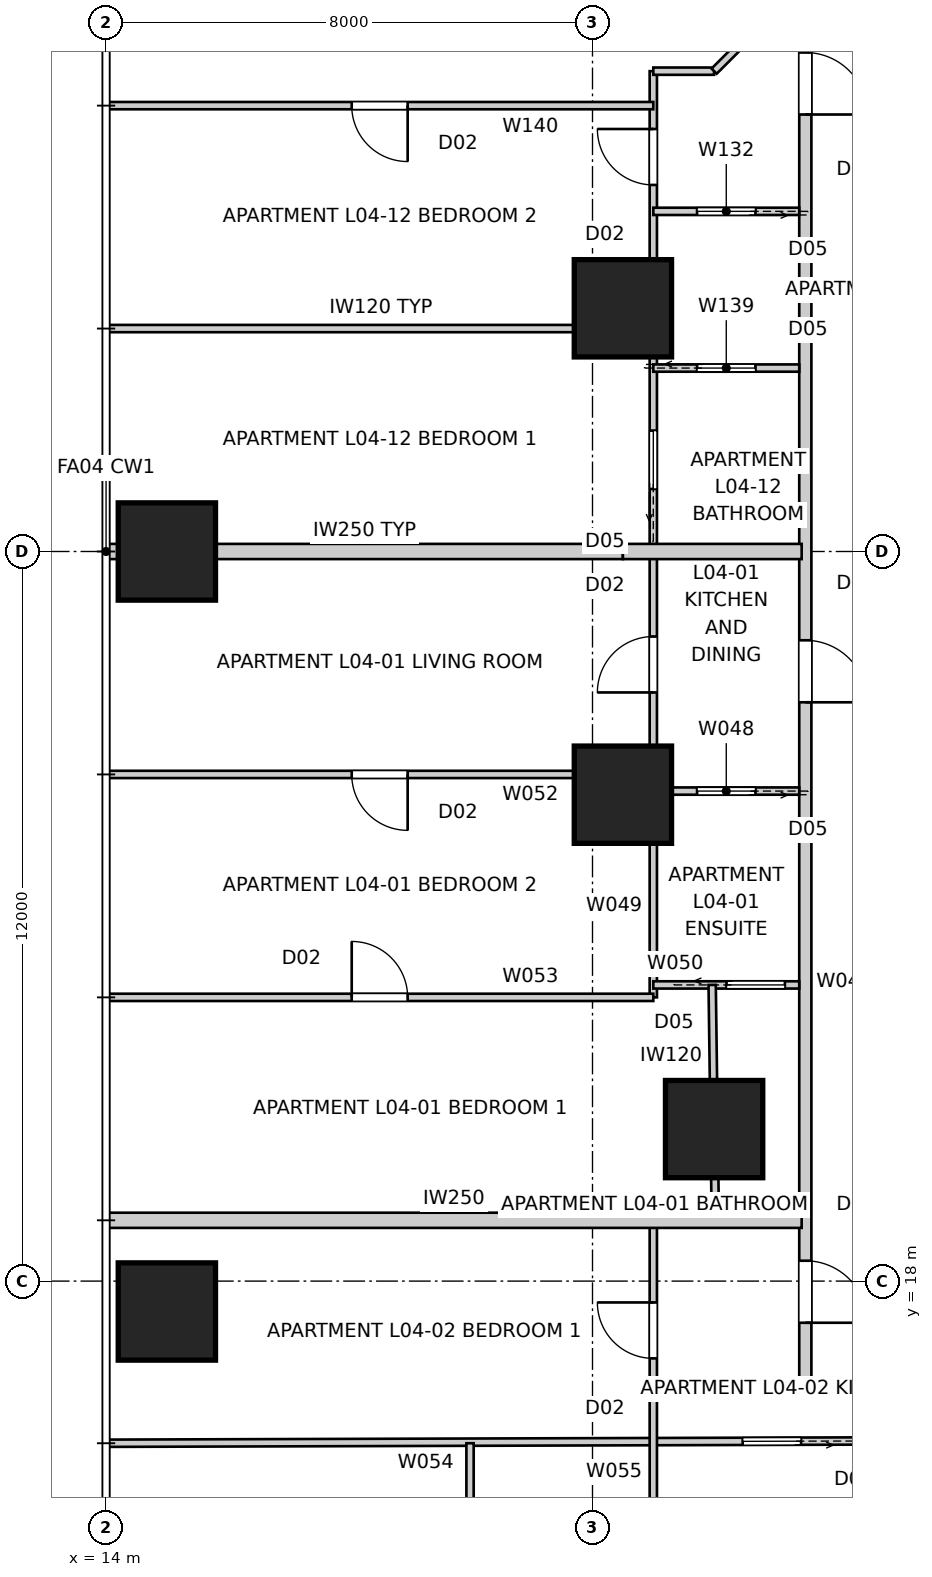
"""IFC4 building model, lengths in metres.
Left out: names, types, materials, properties, quantities, classifications, styles, units other than length and angle.
Written with IfcOpenShell. Run it as: python <this file> out.ifc"""

import sys

from ifc_helpers import new_model, si_unit, direction, frame, frame_2d, origin, origin_2d, place, context, subcontext, project, spatial, rectangle, extrude, element, fill, save


model = new_model("IFC4")
c1 = context("Model", 3, precision=1e-05, world=origin(), true_north=direction((0.0, 1.0)))
c2 = subcontext(c1, "Body", "Model", "MODEL_VIEW")
j1 = project(units=[si_unit("LENGTHUNIT", "METRE"), si_unit("PLANEANGLEUNIT", "RADIAN")], contexts=[c1])
p1 = place(None, origin())
s1 = spatial("IfcSite", under=j1, at=p1, CompositionType="ELEMENT")
p2 = place(p1, origin())
s2 = spatial("IfcBuilding", under=s1, at=p2, CompositionType="ELEMENT")
p3 = place(p2, frame((0.0, 0.0, 18.4)))
s3 = spatial("IfcBuildingStorey", under=s2, at=p3, CompositionType="ELEMENT", Elevation=18.4)
for number, where, z_axis, x_axis in (
    (1, (15.0, 30.0, 0.0), (0.0, 0.0, 1.0), (1.0, 0.0, 0.0)),
    (2, (15.0, 17.5, 0.0), (0.0, 0.0, 1.0), (1.0, 0.0, 0.0)),
    (3, (22.5, 34.0, 0.0), (0.0, 0.0, 1.0), (1.0, 0.0, 0.0)),
    (4, (22.5, 26.0, 0.0), (0.0, 0.0, 1.0), (1.0, 0.0, 0.0)),
    (5, (24.0, 20.5, 0.0), (0.0, 0.0, 1.0), (1.0, 0.0, 0.0)),
):
    element("IfcColumn", number, at=place(p3, frame(where, z_axis=z_axis, x_axis=x_axis)), inside=s3, PredefinedType="COLUMN", context=c2, shape_type="SweptSolid", body=[
        extrude(rectangle(XDim=1.6, YDim=1.6, at=origin_2d()), origin(), (0.0, 0.0, 1.0), 3.4),
    ])
p4 = place(p3, frame((25.5, 16.3, 0.0), z_axis=(0.0, 0.0, 1.0), x_axis=(1.0, 0.0, 0.0)))
e6 = element("IfcWall", 6, at=p4, inside=s3, PredefinedType="PARTITIONING", context=c2, shape_type="SweptSolid", body=[
    extrude(rectangle(XDim=29.0, YDim=0.2, at=frame_2d((14.5, 0.0))), origin(), (0.0, 0.0, 1.0), 3.25),
])
p5 = place(p4, frame((18.734, 0.0, 0.0)))
e7 = element("IfcOpeningElement", 7, at=p5, cuts=e6, PredefinedType="OPENING", context=c2, shape_type="SweptSolid", body=[
    extrude(rectangle(XDim=1.02, YDim=2.34, at=frame_2d((0.51, 1.17))), frame((0.0, 0.11, 0.0), z_axis=(0.0, -1.0, 0.0), x_axis=(1.0, 0.0, 0.0)), (0.0, 0.0, 1.0), 0.22),
])
p6 = place(p4, frame((5.096, 0.0, 0.0)))
e8 = element("IfcOpeningElement", 8, at=p6, cuts=e6, PredefinedType="OPENING", context=c2, shape_type="SweptSolid", body=[
    extrude(rectangle(XDim=1.02, YDim=2.34, at=frame_2d((0.51, 1.17))), frame((0.0, 0.11, 0.0), z_axis=(0.0, -1.0, 0.0), x_axis=(1.0, 0.0, 0.0)), (0.0, 0.0, 1.0), 0.22),
])
p7 = place(p3, frame((25.5, 43.7, 0.0), z_axis=(0.0, 0.0, 1.0), x_axis=(0.0, -1.0, 0.0)))
e9 = element("IfcWall", 9, at=p7, inside=s3, PredefinedType="PARTITIONING", context=c2, shape_type="SweptSolid", body=[
    extrude(rectangle(XDim=27.4, YDim=0.2, at=frame_2d((13.7, 0.0))), origin(), (0.0, 0.0, 1.0), 3.25),
])
p8 = place(p7, frame((5.493, 0.0, 0.0)))
e10 = element("IfcOpeningElement", 10, at=p8, cuts=e9, PredefinedType="OPENING", context=c2, shape_type="SweptSolid", body=[
    extrude(rectangle(XDim=1.02, YDim=2.34, at=frame_2d((0.51, 1.17))), frame((0.0, 0.11, 0.0), z_axis=(0.0, -1.0, 0.0), x_axis=(1.0, 0.0, 0.0)), (0.0, 0.0, 1.0), 0.22),
])
p9 = place(p7, frame((15.16, 0.0, 0.0)))
e11 = element("IfcOpeningElement", 11, at=p9, cuts=e9, PredefinedType="OPENING", context=c2, shape_type="SweptSolid", body=[
    extrude(rectangle(XDim=1.02, YDim=2.34, at=frame_2d((0.51, 1.17))), frame((0.0, 0.11, 0.0), z_axis=(0.0, -1.0, 0.0), x_axis=(1.0, 0.0, 0.0)), (0.0, 0.0, 1.0), 0.22),
])
p10 = place(p7, frame((25.365, 0.0, 0.0)))
e12 = element("IfcOpeningElement", 12, at=p10, cuts=e9, PredefinedType="OPENING", context=c2, shape_type="SweptSolid", body=[
    extrude(rectangle(XDim=1.02, YDim=2.34, at=frame_2d((0.51, 1.17))), frame((0.0, 0.11, 0.0), z_axis=(0.0, -1.0, 0.0), x_axis=(1.0, 0.0, 0.0)), (0.0, 0.0, 1.0), 0.22),
])
p11 = place(p7, frame((1.015, 0.0, 0.0)))
e13 = element("IfcOpeningElement", 13, at=p11, cuts=e9, PredefinedType="OPENING", context=c2, shape_type="SweptSolid", body=[
    extrude(rectangle(XDim=1.02, YDim=2.34, at=frame_2d((0.51, 1.17))), frame((0.0, 0.11, 0.0), z_axis=(0.0, -1.0, 0.0), x_axis=(1.0, 0.0, 0.0)), (0.0, 0.0, 1.0), 0.22),
])
p12 = place(p3, frame((14.0, 30.0, 0.0), z_axis=(0.0, 0.0, 1.0), x_axis=(1.0, 0.0, 0.0)))
e14 = element("IfcWall", 14, at=p12, inside=s3, PredefinedType="PARTITIONING", context=c2, shape_type="SweptSolid", body=[
    extrude(rectangle(XDim=8.5, YDim=0.25, at=frame_2d((4.25, 0.0))), origin(), (0.0, 0.0, 1.0), 3.25),
])
p13 = place(p3, frame((22.5, 30.0, 0.0), z_axis=(0.0, 0.0, 1.0), x_axis=(1.0, 0.0, 0.0)))
e15 = element("IfcWall", 15, at=p13, inside=s3, PredefinedType="PARTITIONING", context=c2, shape_type="SweptSolid", body=[
    extrude(rectangle(XDim=2.94, YDim=0.25, at=frame_2d((1.47, 0.0))), origin(), (0.0, 0.0, 1.0), 2.795),
])
p14 = place(p3, frame((14.0, 19.0, 0.0), z_axis=(0.0, 0.0, 1.0), x_axis=(1.0, 0.0, 0.0)))
e16 = element("IfcWall", 16, at=p14, inside=s3, PredefinedType="PARTITIONING", context=c2, shape_type="SweptSolid", body=[
    extrude(rectangle(XDim=11.44, YDim=0.25, at=frame_2d((5.72, 0.0))), origin(), (0.0, 0.0, 1.0), 3.25),
])
p15 = place(p3, frame((25.4, 26.06, 0.0), z_axis=(0.0, 0.0, 1.0), x_axis=(-1.0, 0.0, 0.0)))
e17 = element("IfcWall", 17, at=p15, inside=s3, PredefinedType="PARTITIONING", context=c2, shape_type="SweptSolid", body=[
    extrude(rectangle(XDim=2.4, YDim=0.12, at=frame_2d((1.2, 0.0))), origin(), (0.0, 0.0, 1.0), 3.25),
])
p16 = place(p15, frame((0.72, 0.0, 0.0)))
e18 = element("IfcOpeningElement", 18, at=p16, cuts=e17, PredefinedType="OPENING", context=c2, shape_type="SweptSolid", body=[
    extrude(rectangle(XDim=0.96, YDim=2.1, at=frame_2d((0.48, 1.05))), frame((0.0, 0.07, 0.0), z_axis=(0.0, -1.0, 0.0), x_axis=(1.0, 0.0, 0.0)), (0.0, 0.0, 1.0), 0.14),
])
p17 = place(p3, frame((23.0, 22.667, 0.0), z_axis=(0.0, 0.0, 1.0), x_axis=(0.0, 1.0, 0.0)))
e19 = element("IfcWall", 19, at=p17, inside=s3, PredefinedType="PARTITIONING", context=c2, shape_type="SweptSolid", body=[
    extrude(rectangle(XDim=15.233, YDim=0.12, at=frame_2d((7.617, 0.0))), origin(), (0.0, 0.0, 1.0), 2.55),
])
p18 = place(p17, frame((13.362, 0.0, 0.0)))
e20 = element("IfcOpeningElement", 20, at=p18, cuts=e19, PredefinedType="OPENING", context=c2, shape_type="SweptSolid", body=[
    extrude(rectangle(XDim=0.92, YDim=2.34, at=frame_2d((0.46, 1.17))), frame((0.0, 0.07, 0.0), z_axis=(0.0, -1.0, 0.0), x_axis=(1.0, 0.0, 0.0)), (0.0, 0.0, 1.0), 0.14),
])
p19 = place(p17, frame((5.015, 0.0, 0.0)))
e21 = element("IfcOpeningElement", 21, at=p19, cuts=e19, PredefinedType="OPENING", context=c2, shape_type="SweptSolid", body=[
    extrude(rectangle(XDim=0.92, YDim=2.34, at=frame_2d((0.46, 1.17))), frame((0.0, 0.07, 0.0), z_axis=(0.0, -1.0, 0.0), x_axis=(1.0, 0.0, 0.0)), (0.0, 0.0, 1.0), 0.14),
])
p20 = place(p17, frame((8.362, 0.0, 0.0)))
e22 = element("IfcOpeningElement", 22, at=p20, cuts=e19, PredefinedType="OPENING", context=c2, shape_type="SweptSolid", body=[
    extrude(rectangle(XDim=0.96, YDim=2.1, at=frame_2d((0.48, 1.05))), frame((0.0, 0.07, 0.0), z_axis=(0.0, -1.0, 0.0), x_axis=(1.0, 0.0, 0.0)), (0.0, 0.0, 1.0), 0.14),
])
p21 = place(p3, frame((23.0, 22.871, 0.0), z_axis=(0.0, 0.0, 1.0), x_axis=(1.0, 0.0, 0.0)))
e23 = element("IfcWall", 23, at=p21, inside=s3, PredefinedType="PARTITIONING", context=c2, shape_type="SweptSolid", body=[
    extrude(rectangle(XDim=2.4, YDim=0.12, at=frame_2d((1.2, 0.0))), origin(), (0.0, 0.0, 1.0), 3.25),
])
p22 = place(p21, frame((1.204, 0.0, 0.0)))
e24 = element("IfcOpeningElement", 24, at=p22, cuts=e23, PredefinedType="OPENING", context=c2, shape_type="SweptSolid", body=[
    extrude(rectangle(XDim=0.96, YDim=2.1, at=frame_2d((0.48, 1.05))), frame((0.0, 0.07, 0.0), z_axis=(0.0, -1.0, 0.0), x_axis=(1.0, 0.0, 0.0)), (0.0, 0.0, 1.0), 0.14),
])
p23 = place(p3, frame((24.02, 19.0, 0.0), z_axis=(0.0, 0.0, 1.0), x_axis=(-0.013494388256, 0.999908946597, 0.0)))
e25 = element("IfcWall", 25, at=p23, inside=s3, PredefinedType="PARTITIONING", context=c2, shape_type="SweptSolid", body=[
    extrude(rectangle(XDim=3.872, YDim=0.12, at=frame_2d((1.936, 0.0))), origin(), (0.0, 0.0, 1.0), 2.55),
])
p24 = place(p3, frame((23.0, 26.333, 0.0), z_axis=(0.0, 0.0, 1.0), x_axis=(-1.0, 0.0, 0.0)))
e26 = element("IfcWall", 26, at=p24, inside=s3, PredefinedType="PARTITIONING", context=c2, shape_type="SweptSolid", body=[
    extrude(rectangle(XDim=8.96, YDim=0.12, at=frame_2d((4.48, 0.0))), origin(), (0.0, 0.0, 1.0), 3.25),
])
p25 = place(p24, frame((4.04, 0.0, 0.0)))
e27 = element("IfcOpeningElement", 27, at=p25, cuts=e26, PredefinedType="OPENING", context=c2, shape_type="SweptSolid", body=[
    extrude(rectangle(XDim=0.92, YDim=2.34, at=frame_2d((0.46, 1.17))), frame((0.0, 0.07, 0.0), z_axis=(0.0, -1.0, 0.0), x_axis=(1.0, 0.0, 0.0)), (0.0, 0.0, 1.0), 0.14),
])
p26 = place(p3, frame((14.04, 22.667, 0.0), z_axis=(0.0, 0.0, 1.0), x_axis=(1.0, 0.0, 0.0)))
e28 = element("IfcWall", 28, at=p26, inside=s3, PredefinedType="PARTITIONING", context=c2, shape_type="SweptSolid", body=[
    extrude(rectangle(XDim=8.96, YDim=0.12, at=frame_2d((4.48, 0.0))), origin(), (0.0, 0.0, 1.0), 3.25),
])
p27 = place(p26, frame((4.0, 0.0, 0.0)))
e29 = element("IfcOpeningElement", 29, at=p27, cuts=e28, PredefinedType="OPENING", context=c2, shape_type="SweptSolid", body=[
    extrude(rectangle(XDim=0.92, YDim=2.34, at=frame_2d((0.46, 1.17))), frame((0.0, 0.07, 0.0), z_axis=(0.0, -1.0, 0.0), x_axis=(1.0, 0.0, 0.0)), (0.0, 0.0, 1.0), 0.14),
])
p28 = place(p3, frame((29.0, 15.378, 0.0), z_axis=(0.0, 0.0, 1.0), x_axis=(-0.999995589081, -0.002970154664, 0.0)))
e30 = element("IfcWall", 30, at=p28, inside=s3, PredefinedType="PARTITIONING", context=c2, shape_type="SweptSolid", body=[
    extrude(rectangle(XDim=14.96, YDim=0.12, at=frame_2d((7.48, 0.0))), origin(), (0.0, 0.0, 1.0), 2.638),
])
p29 = place(p28, frame((3.57, 0.0, 0.0)))
e31 = element("IfcOpeningElement", 31, at=p29, cuts=e30, PredefinedType="OPENING", context=c2, shape_type="SweptSolid", body=[
    extrude(rectangle(XDim=0.96, YDim=2.1, at=frame_2d((0.48, 1.05))), frame((0.0, 0.07, 0.0), z_axis=(0.0, -1.0, 0.0), x_axis=(1.0, 0.0, 0.0)), (0.0, 0.0, 1.0), 0.14),
])
p30 = place(p3, frame((23.0, 13.0, 0.0), z_axis=(0.0, 0.0, 1.0), x_axis=(0.0, 1.0, 0.0)))
e32 = element("IfcWall", 32, at=p30, inside=s3, PredefinedType="PARTITIONING", context=c2, shape_type="SweptSolid", body=[
    extrude(rectangle(XDim=6.0, YDim=0.12, at=frame_2d((3.0, 0.0))), origin(), (0.0, 0.0, 1.0), 3.25),
])
p31 = place(p30, frame((3.729, 0.0, 0.0)))
e33 = element("IfcOpeningElement", 33, at=p31, cuts=e32, PredefinedType="OPENING", context=c2, shape_type="SweptSolid", body=[
    extrude(rectangle(XDim=0.92, YDim=2.34, at=frame_2d((0.46, 1.17))), frame((0.0, 0.07, 0.0), z_axis=(0.0, -1.0, 0.0), x_axis=(1.0, 0.0, 0.0)), (0.0, 0.0, 1.0), 0.14),
])
p32 = place(p3, frame((19.986, 4.04, 0.0), z_axis=(0.0, 0.0, 1.0), x_axis=(0.0, 1.0, 0.0)))
e34 = element("IfcWall", 34, at=p32, inside=s3, PredefinedType="PARTITIONING", context=c2, shape_type="SweptSolid", body=[
    extrude(rectangle(XDim=11.293, YDim=0.12, at=frame_2d((5.646, 0.0))), origin(), (0.0, 0.0, 1.0), 3.25),
])
p33 = place(p32, frame((3.358, 0.0, 0.0)))
e35 = element("IfcOpeningElement", 35, at=p33, cuts=e34, PredefinedType="OPENING", context=c2, shape_type="SweptSolid", body=[
    extrude(rectangle(XDim=0.92, YDim=2.34, at=frame_2d((0.46, 1.17))), frame((0.0, 0.07, 0.0), z_axis=(0.0, -1.0, 0.0), x_axis=(1.0, 0.0, 0.0)), (0.0, 0.0, 1.0), 0.14),
])
p34 = place(p32, frame((8.975, 0.0, 0.0)))
e36 = element("IfcOpeningElement", 36, at=p34, cuts=e34, PredefinedType="OPENING", context=c2, shape_type="SweptSolid", body=[
    extrude(rectangle(XDim=0.92, YDim=2.34, at=frame_2d((0.46, 1.17))), frame((0.0, 0.07, 0.0), z_axis=(0.0, -1.0, 0.0), x_axis=(1.0, 0.0, 0.0)), (0.0, 0.0, 1.0), 0.14),
])
p35 = place(p3, frame((25.4, 35.594, 0.0), z_axis=(0.0, 0.0, 1.0), x_axis=(-1.0, 0.0, 0.0)))
e37 = element("IfcWall", 37, at=p35, inside=s3, PredefinedType="PARTITIONING", context=c2, shape_type="SweptSolid", body=[
    extrude(rectangle(XDim=2.4, YDim=0.12, at=frame_2d((1.2, 0.0))), origin(), (0.0, 0.0, 1.0), 3.25),
])
p36 = place(p35, frame((0.72, 0.0, 0.0)))
e38 = element("IfcOpeningElement", 38, at=p36, cuts=e37, PredefinedType="OPENING", context=c2, shape_type="SweptSolid", body=[
    extrude(rectangle(XDim=0.96, YDim=2.1, at=frame_2d((0.48, 1.05))), frame((0.0, 0.07, 0.0), z_axis=(0.0, -1.0, 0.0), x_axis=(1.0, 0.0, 0.0)), (0.0, 0.0, 1.0), 0.14),
])
p37 = place(p3, frame((23.0, 37.9, 0.0), z_axis=(0.0, 0.0, 1.0), x_axis=(1.0, 0.0, 0.0)))
e39 = element("IfcWall", 39, at=p37, inside=s3, PredefinedType="PARTITIONING", context=c2, shape_type="SweptSolid", body=[
    extrude(rectangle(XDim=1.0, YDim=0.12, at=frame_2d((0.5, 0.0))), origin(), (0.0, 0.0, 1.0), 3.25),
])
p38 = place(p3, frame((24.0, 37.9, 0.0), z_axis=(0.0, 0.0, 1.0), x_axis=(0.707106781187, 0.707106781187, 0.0)))
e40 = element("IfcWall", 40, at=p38, inside=s3, PredefinedType="PARTITIONING", context=c2, shape_type="SweptSolid", body=[
    extrude(rectangle(XDim=1.061, YDim=0.12, at=frame_2d((0.53, 0.0))), origin(), (0.0, 0.0, 1.0), 3.25),
])
p39 = place(p3, frame((23.0, 33.017, 0.0), z_axis=(0.0, 0.0, 1.0), x_axis=(1.0, 0.0, 0.0)))
e41 = element("IfcWall", 41, at=p39, inside=s3, PredefinedType="PARTITIONING", context=c2, shape_type="SweptSolid", body=[
    extrude(rectangle(XDim=2.4, YDim=0.12, at=frame_2d((1.2, 0.0))), origin(), (0.0, 0.0, 1.0), 3.25),
])
p40 = place(p39, frame((0.72, 0.0, 0.0)))
e42 = element("IfcOpeningElement", 42, at=p40, cuts=e41, PredefinedType="OPENING", context=c2, shape_type="SweptSolid", body=[
    extrude(rectangle(XDim=0.96, YDim=2.1, at=frame_2d((0.48, 1.05))), frame((0.0, 0.07, 0.0), z_axis=(0.0, -1.0, 0.0), x_axis=(1.0, 0.0, 0.0)), (0.0, 0.0, 1.0), 0.14),
])
p41 = place(p3, frame((23.0, 37.333, 0.0), z_axis=(0.0, 0.0, 1.0), x_axis=(-1.0, 0.0, 0.0)))
e43 = element("IfcWall", 43, at=p41, inside=s3, PredefinedType="PARTITIONING", context=c2, shape_type="SweptSolid", body=[
    extrude(rectangle(XDim=8.96, YDim=0.12, at=frame_2d((4.48, 0.0))), origin(), (0.0, 0.0, 1.0), 3.25),
])
p42 = place(p41, frame((4.04, 0.0, 0.0)))
e44 = element("IfcOpeningElement", 44, at=p42, cuts=e43, PredefinedType="OPENING", context=c2, shape_type="SweptSolid", body=[
    extrude(rectangle(XDim=0.92, YDim=2.34, at=frame_2d((0.46, 1.17))), frame((0.0, 0.07, 0.0), z_axis=(0.0, -1.0, 0.0), x_axis=(1.0, 0.0, 0.0)), (0.0, 0.0, 1.0), 0.14),
])
p43 = place(p3, frame((14.04, 33.667, 0.0), z_axis=(0.0, 0.0, 1.0), x_axis=(1.0, 0.0, 0.0)))
e45 = element("IfcWall", 45, at=p43, inside=s3, PredefinedType="PARTITIONING", context=c2, shape_type="SweptSolid", body=[
    extrude(rectangle(XDim=8.96, YDim=0.12, at=frame_2d((4.48, 0.0))), origin(), (0.0, 0.0, 1.0), 3.25),
])
p44 = place(p8, origin())
e46 = element("IfcDoor", 46, at=p44, inside=s3, OperationType="SINGLE_SWING_RIGHT", PredefinedType="DOOR", context=c2, shape_type="SweptSolid", body=[
    extrude(rectangle(XDim=1.02, YDim=2.34, at=frame_2d((0.51, 1.17))), frame((0.0, 0.025, 0.0), z_axis=(0.0, -1.0, 0.0), x_axis=(1.0, 0.0, 0.0)), (0.0, 0.0, 1.0), 0.05),
])
fill(e10, e46)
p45 = place(p9, origin())
e47 = element("IfcDoor", 47, at=p45, inside=s3, OperationType="SINGLE_SWING_RIGHT", PredefinedType="DOOR", context=c2, shape_type="SweptSolid", body=[
    extrude(rectangle(XDim=1.02, YDim=2.34, at=frame_2d((0.51, 1.17))), frame((0.0, 0.025, 0.0), z_axis=(0.0, -1.0, 0.0), x_axis=(1.0, 0.0, 0.0)), (0.0, 0.0, 1.0), 0.05),
])
fill(e11, e47)
p46 = place(p10, origin())
e48 = element("IfcDoor", 48, at=p46, inside=s3, OperationType="SINGLE_SWING_RIGHT", PredefinedType="DOOR", context=c2, shape_type="SweptSolid", body=[
    extrude(rectangle(XDim=1.02, YDim=2.34, at=frame_2d((0.51, 1.17))), frame((0.0, 0.025, 0.0), z_axis=(0.0, -1.0, 0.0), x_axis=(1.0, 0.0, 0.0)), (0.0, 0.0, 1.0), 0.05),
])
fill(e12, e48)
p47 = place(p36, origin())
e49 = element("IfcDoor", 49, at=p47, inside=s3, OperationType="SLIDING_TO_LEFT", PredefinedType="DOOR", context=c2, shape_type="SweptSolid", body=[
    extrude(rectangle(XDim=0.96, YDim=2.1, at=frame_2d((0.48, 1.05))), frame((0.0, 0.025, 0.0), z_axis=(0.0, -1.0, 0.0), x_axis=(1.0, 0.0, 0.0)), (0.0, 0.0, 1.0), 0.05),
])
fill(e38, e49)
p48 = place(p18, origin())
e50 = element("IfcDoor", 50, at=p48, inside=s3, OperationType="SINGLE_SWING_RIGHT", PredefinedType="DOOR", context=c2, shape_type="SweptSolid", body=[
    extrude(rectangle(XDim=0.92, YDim=2.34, at=frame_2d((0.46, 1.17))), frame((0.0, 0.025, 0.0), z_axis=(0.0, -1.0, 0.0), x_axis=(1.0, 0.0, 0.0)), (0.0, 0.0, 1.0), 0.05),
])
fill(e20, e50)
p49 = place(p19, origin())
e51 = element("IfcDoor", 51, at=p49, inside=s3, OperationType="SINGLE_SWING_LEFT", PredefinedType="DOOR", context=c2, shape_type="SweptSolid", body=[
    extrude(rectangle(XDim=0.92, YDim=2.34, at=frame_2d((0.46, 1.17))), frame((0.0, 0.025, 0.0), z_axis=(0.0, -1.0, 0.0), x_axis=(1.0, 0.0, 0.0)), (0.0, 0.0, 1.0), 0.05),
])
fill(e21, e51)
p50 = place(p16, origin())
e52 = element("IfcDoor", 52, at=p50, inside=s3, OperationType="SLIDING_TO_LEFT", PredefinedType="DOOR", context=c2, shape_type="SweptSolid", body=[
    extrude(rectangle(XDim=0.96, YDim=2.1, at=frame_2d((0.48, 1.05))), frame((0.0, 0.025, 0.0), z_axis=(0.0, -1.0, 0.0), x_axis=(1.0, 0.0, 0.0)), (0.0, 0.0, 1.0), 0.05),
])
fill(e18, e52)
p51 = place(p29, origin())
e53 = element("IfcDoor", 53, at=p51, inside=s3, OperationType="SLIDING_TO_LEFT", PredefinedType="DOOR", context=c2, shape_type="SweptSolid", body=[
    extrude(rectangle(XDim=0.96, YDim=2.1, at=frame_2d((0.48, 1.05))), frame((0.0, 0.025, 0.0), z_axis=(0.0, -1.0, 0.0), x_axis=(1.0, 0.0, 0.0)), (0.0, 0.0, 1.0), 0.05),
])
fill(e31, e53)
p52 = place(p31, origin())
e54 = element("IfcDoor", 54, at=p52, inside=s3, OperationType="SINGLE_SWING_RIGHT", PredefinedType="DOOR", context=c2, shape_type="SweptSolid", body=[
    extrude(rectangle(XDim=0.92, YDim=2.34, at=frame_2d((0.46, 1.17))), frame((0.0, 0.025, 0.0), z_axis=(0.0, -1.0, 0.0), x_axis=(1.0, 0.0, 0.0)), (0.0, 0.0, 1.0), 0.05),
])
fill(e33, e54)
p53 = place(p40, origin())
e55 = element("IfcDoor", 55, at=p53, inside=s3, OperationType="SLIDING_TO_LEFT", PredefinedType="DOOR", context=c2, shape_type="SweptSolid", body=[
    extrude(rectangle(XDim=0.96, YDim=2.1, at=frame_2d((0.48, 1.05))), frame((0.0, 0.025, 0.0), z_axis=(0.0, -1.0, 0.0), x_axis=(1.0, 0.0, 0.0)), (0.0, 0.0, 1.0), 0.05),
])
fill(e42, e55)
p54 = place(p25, origin())
e56 = element("IfcDoor", 56, at=p54, inside=s3, OperationType="SINGLE_SWING_LEFT", PredefinedType="DOOR", context=c2, shape_type="SweptSolid", body=[
    extrude(rectangle(XDim=0.92, YDim=2.34, at=frame_2d((0.46, 1.17))), frame((0.0, 0.025, 0.0), z_axis=(0.0, -1.0, 0.0), x_axis=(1.0, 0.0, 0.0)), (0.0, 0.0, 1.0), 0.05),
])
fill(e27, e56)
p55 = place(p22, origin())
e57 = element("IfcDoor", 57, at=p55, inside=s3, OperationType="SLIDING_TO_LEFT", PredefinedType="DOOR", context=c2, shape_type="SweptSolid", body=[
    extrude(rectangle(XDim=0.96, YDim=2.1, at=frame_2d((0.48, 1.05))), frame((0.0, 0.025, 0.0), z_axis=(0.0, -1.0, 0.0), x_axis=(1.0, 0.0, 0.0)), (0.0, 0.0, 1.0), 0.05),
])
fill(e24, e57)
p56 = place(p20, origin())
e58 = element("IfcDoor", 58, at=p56, inside=s3, OperationType="SLIDING_TO_LEFT", PredefinedType="DOOR", context=c2, shape_type="SweptSolid", body=[
    extrude(rectangle(XDim=0.96, YDim=2.1, at=frame_2d((0.48, 1.05))), frame((0.0, 0.025, 0.0), z_axis=(0.0, -1.0, 0.0), x_axis=(1.0, 0.0, 0.0)), (0.0, 0.0, 1.0), 0.05),
])
fill(e22, e58)
p57 = place(p42, origin())
e59 = element("IfcDoor", 59, at=p57, inside=s3, OperationType="SINGLE_SWING_LEFT", PredefinedType="DOOR", context=c2, shape_type="SweptSolid", body=[
    extrude(rectangle(XDim=0.92, YDim=2.34, at=frame_2d((0.46, 1.17))), frame((0.0, 0.025, 0.0), z_axis=(0.0, -1.0, 0.0), x_axis=(1.0, 0.0, 0.0)), (0.0, 0.0, 1.0), 0.05),
])
fill(e44, e59)
p58 = place(p27, origin())
e60 = element("IfcDoor", 60, at=p58, inside=s3, OperationType="SINGLE_SWING_LEFT", PredefinedType="DOOR", context=c2, shape_type="SweptSolid", body=[
    extrude(rectangle(XDim=0.92, YDim=2.34, at=frame_2d((0.46, 1.17))), frame((0.0, 0.025, 0.0), z_axis=(0.0, -1.0, 0.0), x_axis=(1.0, 0.0, 0.0)), (0.0, 0.0, 1.0), 0.05),
])
fill(e29, e60)
save(model, sys.argv[1])
